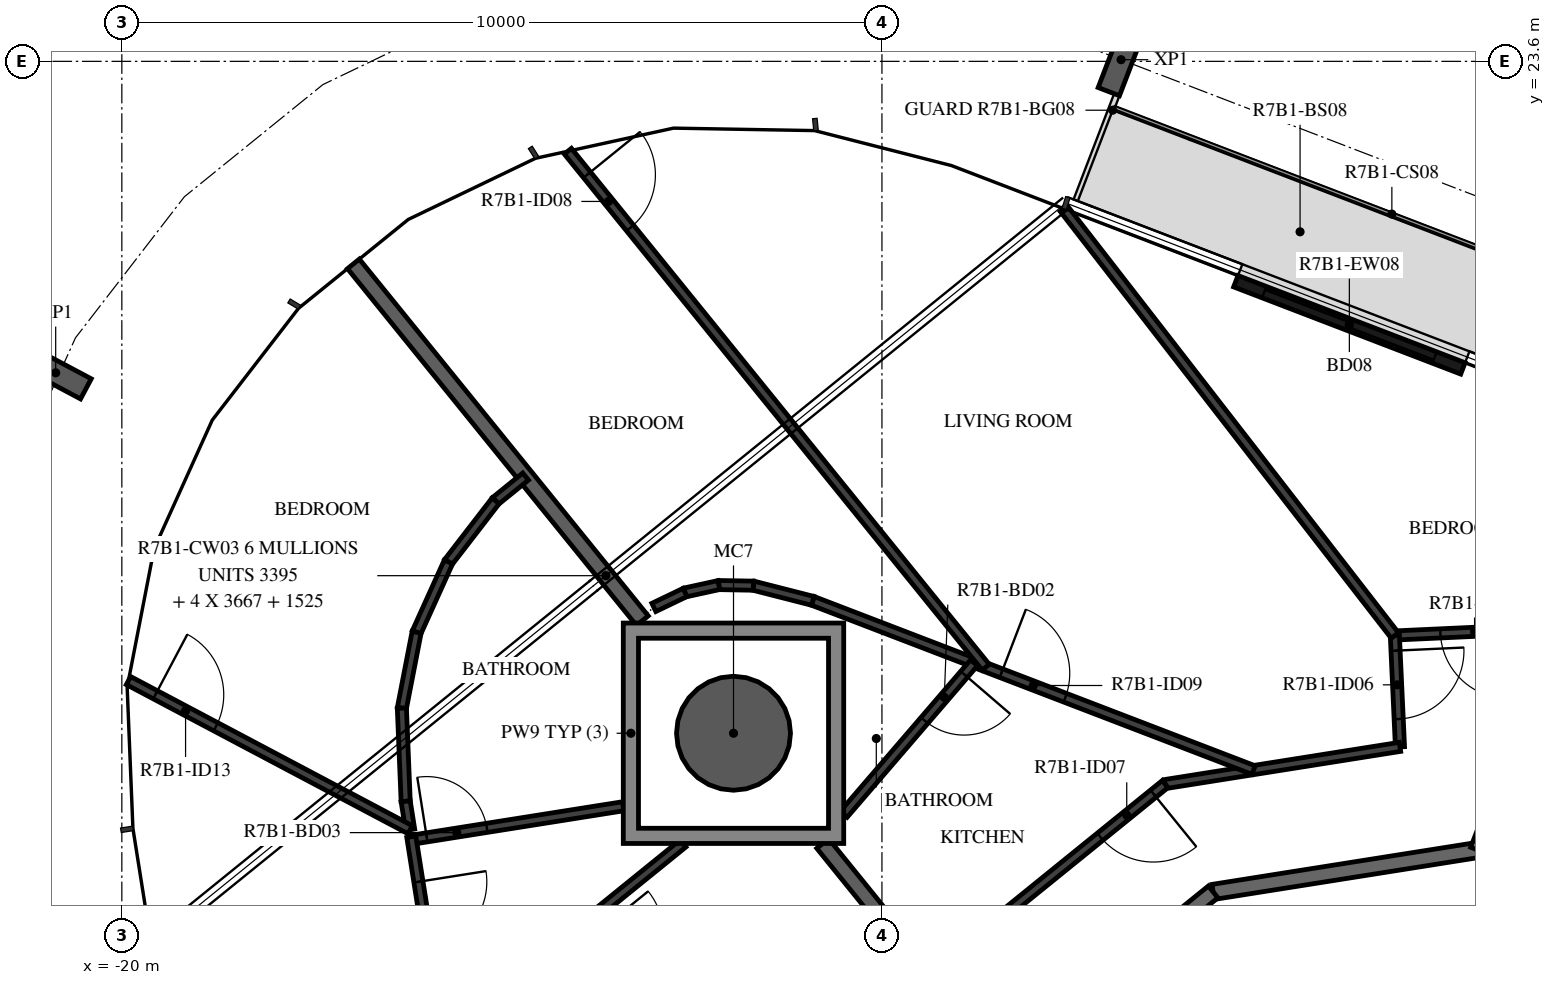
"""IFC4 building model, lengths in metres.
Left out: names, types, materials, properties, quantities, classifications, styles, units other than length and angle.
Written with IfcOpenShell. Run it as: python <this file> out.ifc"""

import sys

from ifc_helpers import new_model, si_unit, direction, frame, frame_2d, origin, origin_2d, place, context, subcontext, project, spatial, polyline, rectangle, hollow_circle, i_section, outline, extrude, element, fill, save


model = new_model("IFC4")
c1 = context("Model", 3, precision=1e-05, world=origin(), true_north=direction((0.0, 1.0)))
c2 = subcontext(c1, "Body", "Model", "MODEL_VIEW")
j1 = project(units=[si_unit("LENGTHUNIT", "METRE"), si_unit("PLANEANGLEUNIT", "RADIAN")], contexts=[c1])
p1 = place(None, origin())
s1 = spatial("IfcSite", under=j1, at=p1, CompositionType="ELEMENT")
p2 = place(p1, origin())
s2 = spatial("IfcBuilding", under=s1, at=p2, CompositionType="ELEMENT")
p3 = place(p2, frame((0.0, 0.0, 273.9)))
s3 = spatial("IfcBuildingStorey", under=s2, at=p3, CompositionType="ELEMENT", Elevation=273.9)
p4 = place(p3, frame((-11.953, 14.76, -0.38), z_axis=(0.0, 0.0, 1.0), x_axis=(1.0, 0.0, 0.0)))
e1 = element("IfcColumn", 1, at=p4, inside=s3, PredefinedType="COLUMN", context=c2, shape_type="SweptSolid", body=[
    extrude(hollow_circle(Radius=0.75, WallThickness=0.035, at=origin_2d()), origin(), (0.0, 0.0, 1.0), 3.5),
])
for number, where, z_axis, x_axis in (
    (2, (-6.854, 23.622, -0.38), (0.0, 0.0, 1.0), (0.934, -0.358, 0.0)),
    (3, (-20.87, 19.503, -0.38), (0.0, 0.0, 1.0), (0.47, 0.883, 0.0)),
):
    element("IfcColumn", number, at=place(p3, frame(where, z_axis=z_axis, x_axis=x_axis)), inside=s3, PredefinedType="COLUMN", context=c2, shape_type="SweptSolid", body=[
        extrude(i_section(OverallWidth=0.3, OverallDepth=0.9, WebThickness=0.019, FlangeThickness=0.035, FilletRadius=0.03, at=origin_2d()), origin(), (0.0, 0.0, 1.0), 3.5),
    ])
p5 = place(p3, frame((-2.357, 19.56, 0.0), z_axis=(0.0, 0.0, 1.0), x_axis=(-0.933553885508, 0.358437083534, 0.0)))
e4 = element("IfcWall", 4, at=p5, inside=s3, PredefinedType="STANDARD", context=c2, shape_type="SweptSolid", body=[
    extrude(rectangle(XDim=3.2, YDim=0.16, at=frame_2d((1.6, 0.0))), origin(), (0.0, 0.0, 1.0), 3.12),
])
p6 = place(p5, frame((0.4, 0.0, 0.0)))
e5 = element("IfcOpeningElement", 5, at=p6, cuts=e4, PredefinedType="OPENING", context=c2, shape_type="SweptSolid", body=[
    extrude(rectangle(XDim=2.4, YDim=2.4, at=frame_2d((1.2, 1.2))), frame((0.0, 0.09, 0.0), z_axis=(0.0, -1.0, 0.0), x_axis=(1.0, 0.0, 0.0)), (0.0, 0.0, 1.0), 0.18),
])
p7 = place(p3, frame((1.45, 13.797, 0.0), z_axis=(0.0, 0.0, 1.0), x_axis=(-0.987690361611, -0.156421704315, 0.0)))
e6 = element("IfcWall", 6, at=p7, inside=s3, PredefinedType="STANDARD", context=c2, shape_type="SweptSolid", body=[
    extrude(rectangle(XDim=7.181, YDim=0.2, at=frame_2d((3.591, 0.0))), origin(), (0.0, 0.0, 1.0), 3.12),
])
p8 = place(p3, frame((-5.643, 12.673, 0.0), z_axis=(0.0, 0.0, 1.0), x_axis=(-0.777160148113, -0.629302871585, 0.0)))
e7 = element("IfcWall", 7, at=p8, inside=s3, PredefinedType="STANDARD", context=c2, shape_type="SweptSolid", body=[
    extrude(rectangle(XDim=7.181, YDim=0.2, at=frame_2d((3.59, 0.0))), origin(), (0.0, 0.0, 1.0), 3.12),
])
p9 = place(p8, frame((2.39, 0.0, 0.0)))
e8 = element("IfcOpeningElement", 8, at=p9, cuts=e7, PredefinedType="OPENING", context=c2, shape_type="SweptSolid", body=[
    extrude(rectangle(XDim=1.0, YDim=2.1, at=frame_2d((0.5, 1.05))), frame((0.0, 0.11, 0.0), z_axis=(0.0, -1.0, 0.0), x_axis=(1.0, 0.0, 0.0)), (0.0, 0.0, 1.0), 0.22),
])
p10 = place(p8, frame((5.192, 0.0, 0.0)))
e9 = element("IfcOpeningElement", 9, at=p10, cuts=e7, PredefinedType="OPENING", context=c2, shape_type="SweptSolid", body=[
    extrude(rectangle(XDim=1.0, YDim=2.1, at=frame_2d((0.5, 1.05))), frame((0.0, 0.11, 0.0), z_axis=(0.0, -1.0, 0.0), x_axis=(1.0, 0.0, 0.0)), (0.0, 0.0, 1.0), 0.22),
])
p11 = place(p3, frame((-0.037, 18.756, 0.0), z_axis=(0.0, 0.0, 1.0), x_axis=(-0.358365943542, -0.933581196527, 0.0)))
e10 = element("IfcWall", 10, at=p11, inside=s3, PredefinedType="STANDARD", context=c2, shape_type="SweptSolid", body=[
    extrude(rectangle(XDim=5.924, YDim=0.2, at=frame_2d((2.962, 0.0))), origin(), (0.0, 0.0, 1.0), 2.73),
])
p12 = place(p3, frame((-10.779, 13.31, 0.0), z_axis=(0.0, 0.0, 1.0), x_axis=(0.62931692753, -0.777148766147, 0.0)))
e11 = element("IfcWall", 11, at=p12, inside=s3, PredefinedType="STANDARD", context=c2, shape_type="SweptSolid", body=[
    extrude(rectangle(XDim=3.727, YDim=0.2, at=frame_2d((1.864, 0.0))), origin(), (0.0, 0.0, 1.0), 3.12),
])
p13 = place(p3, frame((-16.953, 20.936, 0.0), z_axis=(0.0, 0.0, 1.0), x_axis=(0.629347053134, -0.77712437017, 0.0)))
e12 = element("IfcWall", 12, at=p13, inside=s3, PredefinedType="STANDARD", context=c2, shape_type="SweptSolid", body=[
    extrude(rectangle(XDim=6.04, YDim=0.2, at=frame_2d((3.02, 0.0))), origin(), (0.0, 0.0, 1.0), 3.12),
])
p14 = place(p3, frame((-1.554, 16.125, 0.0), z_axis=(0.0, 0.0, 1.0), x_axis=(-0.998943517875, -0.045954848436, 0.0)))
e13 = element("IfcWall", 13, at=p14, inside=s3, PredefinedType="PARTITIONING", context=c2, shape_type="SweptSolid", body=[
    extrude(rectangle(XDim=1.7, YDim=0.12, at=frame_2d((0.85, 0.0))), origin(), (0.0, 0.0, 1.0), 3.12),
])
p15 = place(p14, frame((0.2, 0.0, 0.0)))
e14 = element("IfcOpeningElement", 14, at=p15, cuts=e13, PredefinedType="OPENING", context=c2, shape_type="SweptSolid", body=[
    extrude(rectangle(XDim=0.9, YDim=2.1, at=frame_2d((0.45, 1.05))), frame((0.0, 0.07, 0.0), z_axis=(0.0, -1.0, 0.0), x_axis=(1.0, 0.0, 0.0)), (0.0, 0.0, 1.0), 0.14),
])
p16 = place(p3, frame((-3.252, 16.047, 0.0), z_axis=(0.0, 0.0, 1.0), x_axis=(0.045928493331, -0.998944729953, 0.0)))
e15 = element("IfcWall", 15, at=p16, inside=s3, PredefinedType="PARTITIONING", context=c2, shape_type="SweptSolid", body=[
    extrude(rectangle(XDim=1.467, YDim=0.12, at=frame_2d((0.733, 0.0))), origin(), (0.0, 0.0, 1.0), 3.12),
])
p17 = place(p16, frame((0.2, 0.0, 0.0)))
e16 = element("IfcOpeningElement", 16, at=p17, cuts=e15, PredefinedType="OPENING", context=c2, shape_type="SweptSolid", body=[
    extrude(rectangle(XDim=0.9, YDim=2.1, at=frame_2d((0.45, 1.05))), frame((0.0, 0.07, 0.0), z_axis=(0.0, -1.0, 0.0), x_axis=(1.0, 0.0, 0.0)), (0.0, 0.0, 1.0), 0.14),
])
p18 = place(p3, frame((-3.185, 14.581, 0.0), z_axis=(0.0, 0.0, 1.0), x_axis=(-0.987690712769, -0.156419486991, 0.0)))
e17 = element("IfcWall", 17, at=p18, inside=s3, PredefinedType="PARTITIONING", context=c2, shape_type="SweptSolid", body=[
    extrude(rectangle(XDim=3.128, YDim=0.12, at=frame_2d((1.564, 0.0))), origin(), (0.0, 0.0, 1.0), 3.12),
])
p19 = place(p3, frame((-6.274, 14.092, 0.0), z_axis=(0.0, 0.0, 1.0), x_axis=(-0.777162268892, -0.629300252511, 0.0)))
e18 = element("IfcWall", 18, at=p19, inside=s3, PredefinedType="PARTITIONING", context=c2, shape_type="SweptSolid", body=[
    extrude(rectangle(XDim=3.992, YDim=0.12, at=frame_2d((1.996, 0.0))), origin(), (0.0, 0.0, 1.0), 3.12),
])
p20 = place(p19, frame((0.2, 0.0, 0.0)))
e19 = element("IfcOpeningElement", 19, at=p20, cuts=e18, PredefinedType="OPENING", context=c2, shape_type="SweptSolid", body=[
    extrude(rectangle(XDim=0.9, YDim=2.1, at=frame_2d((0.45, 1.05))), frame((0.0, 0.07, 0.0), z_axis=(0.0, -1.0, 0.0), x_axis=(1.0, 0.0, 0.0)), (0.0, 0.0, 1.0), 0.14),
])
p21 = place(p3, frame((-7.606, 21.661, 0.0), z_axis=(0.0, 0.0, 1.0), x_axis=(0.612852858705, -0.79019704731, 0.0)))
e20 = element("IfcWall", 20, at=p21, inside=s3, PredefinedType="PARTITIONING", context=c2, shape_type="SweptSolid", body=[
    extrude(rectangle(XDim=7.105, YDim=0.12, at=frame_2d((3.552, 0.0))), origin(), (0.0, 0.0, 1.0), 3.12),
])
p22 = place(p3, frame((-10.91, 16.502, 0.0), z_axis=(0.0, 0.0, 1.0), x_axis=(0.933584453869, -0.358357457707, 0.0)))
e21 = element("IfcWall", 21, at=p22, inside=s3, PredefinedType="PARTITIONING", context=c2, shape_type="SweptSolid", body=[
    extrude(rectangle(XDim=6.212, YDim=0.12, at=frame_2d((3.106, 0.0))), origin(), (0.0, 0.0, 1.0), 3.12),
])
p23 = place(p22, frame((2.657, 0.0, 0.0)))
e22 = element("IfcOpeningElement", 22, at=p23, cuts=e21, PredefinedType="OPENING", context=c2, shape_type="SweptSolid", body=[
    extrude(rectangle(XDim=0.9, YDim=2.1, at=frame_2d((0.45, 1.05))), frame((0.0, 0.07, 0.0), z_axis=(0.0, -1.0, 0.0), x_axis=(1.0, 0.0, 0.0)), (0.0, 0.0, 1.0), 0.14),
])
p24 = place(p3, frame((-14.132, 22.418, 0.0), z_axis=(0.0, 0.0, 1.0), x_axis=(0.629309172704, -0.77715504576, 0.0)))
e23 = element("IfcWall", 23, at=p24, inside=s3, PredefinedType="PARTITIONING", context=c2, shape_type="SweptSolid", body=[
    extrude(rectangle(XDim=8.736, YDim=0.12, at=frame_2d((4.368, 0.0))), origin(), (0.0, 0.0, 1.0), 3.12),
])
p25 = place(p24, frame((0.4, 0.0, 0.0)))
e24 = element("IfcOpeningElement", 24, at=p25, cuts=e23, PredefinedType="OPENING", context=c2, shape_type="SweptSolid", body=[
    extrude(rectangle(XDim=0.9, YDim=2.1, at=frame_2d((0.45, 1.05))), frame((0.0, 0.07, 0.0), z_axis=(0.0, -1.0, 0.0), x_axis=(1.0, 0.0, 0.0)), (0.0, 0.0, 1.0), 0.14),
])
p26 = place(p3, frame((-8.788, 15.688, 0.0), z_axis=(0.0, 0.0, 1.0), x_axis=(-0.652090514391, -0.758141122115, 0.0)))
e25 = element("IfcWall", 25, at=p26, inside=s3, PredefinedType="PARTITIONING", context=c2, shape_type="SweptSolid", body=[
    extrude(rectangle(XDim=2.629, YDim=0.12, at=frame_2d((1.314, 0.0))), origin(), (0.0, 0.0, 1.0), 3.12),
])
p27 = place(p26, frame((0.2, 0.0, 0.0)))
e26 = element("IfcOpeningElement", 26, at=p27, cuts=e25, PredefinedType="OPENING", context=c2, shape_type="SweptSolid", body=[
    extrude(rectangle(XDim=0.8, YDim=2.1, at=frame_2d((0.4, 1.05))), frame((0.0, 0.07, 0.0), z_axis=(0.0, -1.0, 0.0), x_axis=(1.0, 0.0, 0.0)), (0.0, 0.0, 1.0), 0.14),
])
p28 = place(p3, frame((-10.91, 16.502, 0.0), z_axis=(0.0, 0.0, 1.0), x_axis=(-0.96886520615, 0.247588796823, 0.0)))
e27 = element("IfcWall", 27, at=p28, inside=s3, PredefinedType="PARTITIONING", context=c2, shape_type="SweptSolid", body=[
    extrude(rectangle(XDim=0.807, YDim=0.12, at=frame_2d((0.403, 0.0))), origin(), (0.0, 0.0, 1.0), 3.12),
])
p29 = place(p3, frame((-11.691, 16.702, 0.0), z_axis=(0.0, 0.0, 1.0), x_axis=(-0.999843155249, 0.017710587291, 0.0)))
e28 = element("IfcWall", 28, at=p29, inside=s3, PredefinedType="PARTITIONING", context=c2, shape_type="SweptSolid", body=[
    extrude(rectangle(XDim=0.455, YDim=0.12, at=frame_2d((0.228, 0.0))), origin(), (0.0, 0.0, 1.0), 3.12),
])
p30 = place(p3, frame((-12.146, 16.71, 0.0), z_axis=(0.0, 0.0, 1.0), x_axis=(-0.976826470165, -0.21403281801, 0.0)))
e29 = element("IfcWall", 29, at=p30, inside=s3, PredefinedType="PARTITIONING", context=c2, shape_type="SweptSolid", body=[
    extrude(rectangle(XDim=0.455, YDim=0.12, at=frame_2d((0.228, 0.0))), origin(), (0.0, 0.0, 1.0), 3.12),
])
p31 = place(p3, frame((-12.591, 16.613, 0.0), z_axis=(0.0, 0.0, 1.0), x_axis=(-0.901405666701, -0.432975546699, 0.0)))
e30 = element("IfcWall", 30, at=p31, inside=s3, PredefinedType="PARTITIONING", context=c2, shape_type="SweptSolid", body=[
    extrude(rectangle(XDim=0.455, YDim=0.12, at=frame_2d((0.227, 0.0))), origin(), (0.0, 0.0, 1.0), 3.12),
])
p32 = place(p3, frame((-12.616, 13.311, 0.0), z_axis=(0.0, 0.0, 1.0), x_axis=(-0.7771657422, -0.629295963082, 0.0)))
e31 = element("IfcWall", 31, at=p32, inside=s3, PredefinedType="PARTITIONING", context=c2, shape_type="SweptSolid", body=[
    extrude(rectangle(XDim=1.653, YDim=0.12, at=frame_2d((0.826, 0.0))), origin(), (0.0, 0.0, 1.0), 3.12),
])
p33 = place(p3, frame((-14.688, 18.138, 0.0), z_axis=(0.0, 0.0, 1.0), x_axis=(-0.777009819755, -0.629488474879, 0.0)))
e32 = element("IfcWall", 32, at=p33, inside=s3, PredefinedType="PARTITIONING", context=c2, shape_type="SweptSolid", body=[
    extrude(rectangle(XDim=0.508, YDim=0.12, at=frame_2d((0.254, 0.0))), origin(), (0.0, 0.0, 1.0), 3.12),
])
p34 = place(p3, frame((-15.083, 17.818, 0.0), z_axis=(0.0, 0.0, 1.0), x_axis=(-0.611091802574, -0.791559731686, 0.0)))
e33 = element("IfcWall", 33, at=p34, inside=s3, PredefinedType="PARTITIONING", context=c2, shape_type="SweptSolid", body=[
    extrude(rectangle(XDim=1.016, YDim=0.12, at=frame_2d((0.508, 0.0))), origin(), (0.0, 0.0, 1.0), 3.12),
])
p35 = place(p3, frame((-15.703, 17.014, 0.0), z_axis=(0.0, 0.0, 1.0), x_axis=(-0.411973085874, -0.911196014322, 0.0)))
e34 = element("IfcWall", 34, at=p35, inside=s3, PredefinedType="PARTITIONING", context=c2, shape_type="SweptSolid", body=[
    extrude(rectangle(XDim=1.016, YDim=0.12, at=frame_2d((0.508, 0.0))), origin(), (0.0, 0.0, 1.0), 3.12),
])
p36 = place(p3, frame((-16.122, 16.088, 0.0), z_axis=(0.0, 0.0, 1.0), x_axis=(-0.191030445301, -0.981584112019, 0.0)))
e35 = element("IfcWall", 35, at=p36, inside=s3, PredefinedType="PARTITIONING", context=c2, shape_type="SweptSolid", body=[
    extrude(rectangle(XDim=1.016, YDim=0.12, at=frame_2d((0.508, 0.0))), origin(), (0.0, 0.0, 1.0), 3.12),
])
p37 = place(p3, frame((-16.316, 15.091, 0.0), z_axis=(0.0, 0.0, 1.0), x_axis=(0.040786423131, -0.999167887639, 0.0)))
e36 = element("IfcWall", 36, at=p37, inside=s3, PredefinedType="PARTITIONING", context=c2, shape_type="SweptSolid", body=[
    extrude(rectangle(XDim=1.227, YDim=0.12, at=frame_2d((0.614, 0.0))), origin(), (0.0, 0.0, 1.0), 3.12),
])
p38 = place(p3, frame((-16.266, 13.865, 0.0), z_axis=(0.0, 0.0, 1.0), x_axis=(0.156757556272, -0.987637113798, 0.0)))
e37 = element("IfcWall", 37, at=p38, inside=s3, PredefinedType="PARTITIONING", context=c2, shape_type="SweptSolid", body=[
    extrude(rectangle(XDim=0.378, YDim=0.12, at=frame_2d((0.189, 0.0))), origin(), (0.0, 0.0, 1.0), 3.12),
])
p39 = place(p3, frame((-16.186, 13.359, 0.0), z_axis=(0.0, 0.0, 1.0), x_axis=(0.987680631298, 0.156483131865, 0.0)))
e38 = element("IfcWall", 38, at=p39, inside=s3, PredefinedType="PARTITIONING", context=c2, shape_type="SweptSolid", body=[
    extrude(rectangle(XDim=2.818, YDim=0.12, at=frame_2d((1.409, 0.0))), origin(), (0.0, 0.0, 1.0), 3.12),
])
p40 = place(p39, frame((0.2, 0.0, 0.0)))
e39 = element("IfcOpeningElement", 39, at=p40, cuts=e38, PredefinedType="OPENING", context=c2, shape_type="SweptSolid", body=[
    extrude(rectangle(XDim=0.8, YDim=2.1, at=frame_2d((0.4, 1.05))), frame((0.0, 0.07, 0.0), z_axis=(0.0, -1.0, 0.0), x_axis=(1.0, 0.0, 0.0)), (0.0, 0.0, 1.0), 0.14),
])
p41 = place(p3, frame((-19.913, 15.454, 0.0), z_axis=(0.0, 0.0, 1.0), x_axis=(0.883751094582, -0.467957266024, 0.0)))
e40 = element("IfcWall", 40, at=p41, inside=s3, PredefinedType="PARTITIONING", context=c2, shape_type="SweptSolid", body=[
    extrude(rectangle(XDim=4.194, YDim=0.12, at=frame_2d((2.097, 0.0))), origin(), (0.0, 0.0, 1.0), 3.12),
])
p42 = place(p41, frame((0.4, 0.0, 0.0)))
e41 = element("IfcOpeningElement", 41, at=p42, cuts=e40, PredefinedType="OPENING", context=c2, shape_type="SweptSolid", body=[
    extrude(rectangle(XDim=0.9, YDim=2.1, at=frame_2d((0.45, 1.05))), frame((0.0, 0.07, 0.0), z_axis=(0.0, -1.0, 0.0), x_axis=(1.0, 0.0, 0.0)), (0.0, 0.0, 1.0), 0.14),
])
p43 = place(p3, frame((-16.192, 13.399, 0.0), z_axis=(0.0, 0.0, 1.0), x_axis=(0.156405047803, -0.987692999379, 0.0)))
e42 = element("IfcWall", 42, at=p43, inside=s3, PredefinedType="PARTITIONING", context=c2, shape_type="SweptSolid", body=[
    extrude(rectangle(XDim=9.01, YDim=0.12, at=frame_2d((4.505, 0.0))), origin(), (0.0, 0.0, 1.0), 3.12),
])
p44 = place(p43, frame((0.6, 0.0, 0.0)))
e43 = element("IfcOpeningElement", 43, at=p44, cuts=e42, PredefinedType="OPENING", context=c2, shape_type="SweptSolid", body=[
    extrude(rectangle(XDim=0.9, YDim=2.1, at=frame_2d((0.45, 1.05))), frame((0.0, 0.07, 0.0), z_axis=(0.0, -1.0, 0.0), x_axis=(1.0, 0.0, 0.0)), (0.0, 0.0, 1.0), 0.14),
])
p45 = place(p43, frame((4.725, 0.0, 0.0)))
e44 = element("IfcOpeningElement", 44, at=p45, cuts=e42, PredefinedType="OPENING", context=c2, shape_type="SweptSolid", body=[
    extrude(rectangle(XDim=0.9, YDim=2.1, at=frame_2d((0.45, 1.05))), frame((0.0, 0.07, 0.0), z_axis=(0.0, -1.0, 0.0), x_axis=(1.0, 0.0, 0.0)), (0.0, 0.0, 1.0), 0.14),
])
p46 = place(p3, origin())
e45 = element("IfcWall", 45, at=p46, inside=s3, PredefinedType="STANDARD", context=c2, shape_type="SweptSolid", body=[
    extrude(outline(polyline([(-10.503, 16.21), (-10.503, 13.311), (-13.403, 13.311), (-13.403, 16.21), (-10.503, 16.21)]), holes=[polyline([(-13.203, 13.51), (-10.703, 13.51), (-10.703, 16.01), (-13.203, 16.01), (-13.203, 13.51)])]), origin(), (0.0, 0.0, 1.0), 3.12),
])
p47 = place(p6, origin())
e46 = element("IfcDoor", 46, at=p47, inside=s3, OperationType="DOUBLE_DOOR_SLIDING", PredefinedType="DOOR", context=c2, shape_type="SweptSolid", body=[
    extrude(rectangle(XDim=2.4, YDim=2.4, at=frame_2d((1.2, 1.2))), frame((0.0, 0.025, 0.0), z_axis=(0.0, -1.0, 0.0), x_axis=(1.0, 0.0, 0.0)), (0.0, 0.0, 1.0), 0.05),
])
fill(e5, e46)
p48 = place(p15, origin())
e47 = element("IfcDoor", 47, at=p48, inside=s3, OperationType="SINGLE_SWING_RIGHT", PredefinedType="DOOR", context=c2, shape_type="SweptSolid", body=[
    extrude(rectangle(XDim=0.9, YDim=2.1, at=frame_2d((0.45, 1.05))), frame((0.0, 0.025, 0.0), z_axis=(0.0, -1.0, 0.0), x_axis=(1.0, 0.0, 0.0)), (0.0, 0.0, 1.0), 0.05),
])
fill(e14, e47)
p49 = place(p17, origin())
e48 = element("IfcDoor", 48, at=p49, inside=s3, OperationType="SINGLE_SWING_LEFT", PredefinedType="DOOR", context=c2, shape_type="SweptSolid", body=[
    extrude(rectangle(XDim=0.9, YDim=2.1, at=frame_2d((0.45, 1.05))), frame((0.0, 0.025, 0.0), z_axis=(0.0, -1.0, 0.0), x_axis=(1.0, 0.0, 0.0)), (0.0, 0.0, 1.0), 0.05),
])
fill(e16, e48)
p50 = place(p20, origin())
e49 = element("IfcDoor", 49, at=p50, inside=s3, OperationType="SINGLE_SWING_RIGHT", PredefinedType="DOOR", context=c2, shape_type="SweptSolid", body=[
    extrude(rectangle(XDim=0.9, YDim=2.1, at=frame_2d((0.45, 1.05))), frame((0.0, 0.025, 0.0), z_axis=(0.0, -1.0, 0.0), x_axis=(1.0, 0.0, 0.0)), (0.0, 0.0, 1.0), 0.05),
])
fill(e19, e49)
p51 = place(p27, origin())
e50 = element("IfcDoor", 50, at=p51, inside=s3, OperationType="SINGLE_SWING_RIGHT", PredefinedType="DOOR", context=c2, shape_type="SweptSolid", body=[
    extrude(rectangle(XDim=0.8, YDim=2.1, at=frame_2d((0.4, 1.05))), frame((0.0, 0.025, 0.0), z_axis=(0.0, -1.0, 0.0), x_axis=(1.0, 0.0, 0.0)), (0.0, 0.0, 1.0), 0.05),
])
fill(e26, e50)
p52 = place(p25, origin())
e51 = element("IfcDoor", 51, at=p52, inside=s3, OperationType="SINGLE_SWING_RIGHT", PredefinedType="DOOR", context=c2, shape_type="SweptSolid", body=[
    extrude(rectangle(XDim=0.9, YDim=2.1, at=frame_2d((0.45, 1.05))), frame((0.0, 0.025, 0.0), z_axis=(0.0, -1.0, 0.0), x_axis=(1.0, 0.0, 0.0)), (0.0, 0.0, 1.0), 0.05),
])
fill(e24, e51)
p53 = place(p23, origin())
e52 = element("IfcDoor", 52, at=p53, inside=s3, OperationType="SINGLE_SWING_LEFT", PredefinedType="DOOR", context=c2, shape_type="SweptSolid", body=[
    extrude(rectangle(XDim=0.9, YDim=2.1, at=frame_2d((0.45, 1.05))), frame((0.0, 0.025, 0.0), z_axis=(0.0, -1.0, 0.0), x_axis=(1.0, 0.0, 0.0)), (0.0, 0.0, 1.0), 0.05),
])
fill(e22, e52)
p54 = place(p40, origin())
e53 = element("IfcDoor", 53, at=p54, inside=s3, OperationType="SINGLE_SWING_LEFT", PredefinedType="DOOR", context=c2, shape_type="SweptSolid", body=[
    extrude(rectangle(XDim=0.8, YDim=2.1, at=frame_2d((0.4, 1.05))), frame((0.0, 0.025, 0.0), z_axis=(0.0, -1.0, 0.0), x_axis=(1.0, 0.0, 0.0)), (0.0, 0.0, 1.0), 0.05),
])
fill(e39, e53)
p55 = place(p44, origin())
e54 = element("IfcDoor", 54, at=p55, inside=s3, OperationType="SINGLE_SWING_LEFT", PredefinedType="DOOR", context=c2, shape_type="SweptSolid", body=[
    extrude(rectangle(XDim=0.9, YDim=2.1, at=frame_2d((0.45, 1.05))), frame((0.0, 0.025, 0.0), z_axis=(0.0, -1.0, 0.0), x_axis=(1.0, 0.0, 0.0)), (0.0, 0.0, 1.0), 0.05),
])
fill(e43, e54)
p56 = place(p42, origin())
e55 = element("IfcDoor", 55, at=p56, inside=s3, OperationType="SINGLE_SWING_LEFT", PredefinedType="DOOR", context=c2, shape_type="SweptSolid", body=[
    extrude(rectangle(XDim=0.9, YDim=2.1, at=frame_2d((0.45, 1.05))), frame((0.0, 0.025, 0.0), z_axis=(0.0, -1.0, 0.0), x_axis=(1.0, 0.0, 0.0)), (0.0, 0.0, 1.0), 0.05),
])
fill(e41, e55)
save(model, sys.argv[1])
